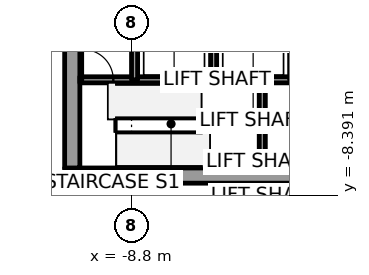
"""IFC4 building model, lengths in metres.
Left out: names, types, materials, properties, quantities, classifications, styles, units other than length and angle.
Written with IfcOpenShell. Run it as: python <this file> out.ifc"""

import sys

from ifc_helpers import new_model, si_unit, direction, frame, frame_2d, origin, place, context, subcontext, project, spatial, rectangle, extrude, element, fill, save


model = new_model("IFC4")
c1 = context("Model", 3, precision=1e-05, world=origin(), true_north=direction((0.0, 1.0)))
c2 = subcontext(c1, "Body", "Model", "MODEL_VIEW")
j1 = project(units=[si_unit("LENGTHUNIT", "METRE"), si_unit("PLANEANGLEUNIT", "RADIAN")], contexts=[c1])
p1 = place(None, origin())
s1 = spatial("IfcSite", under=j1, at=p1, CompositionType="ELEMENT")
p2 = place(p1, origin())
s2 = spatial("IfcBuilding", under=s1, at=p2, CompositionType="ELEMENT")
p3 = place(p2, frame((0.0, 0.0, 9.0)))
s3 = spatial("IfcBuildingStorey", under=s2, at=p3, CompositionType="ELEMENT", Elevation=9.0)
p4 = place(p3, frame((-11.0, -7.75, 0.0), z_axis=(0.0, 0.0, 1.0), x_axis=(1.0, 0.0, 0.0)))
e1 = element("IfcWall", 1, at=p4, inside=s3, PredefinedType="SHEAR", context=c2, shape_type="SweptSolid", body=[
    extrude(rectangle(XDim=22.0, YDim=0.5, at=frame_2d((11.0, 0.0))), origin(), (0.0, 0.0, 1.0), 7.8),
])
p5 = place(p4, frame((10.45, 0.0, 0.0)))
e2 = element("IfcOpeningElement", 2, at=p5, cuts=e1, PredefinedType="OPENING", context=c2, shape_type="SweptSolid", body=[
    extrude(rectangle(XDim=1.1, YDim=2.1, at=frame_2d((0.55, 1.05))), frame((0.0, 0.25, 0.0), z_axis=(0.0, -1.0, 0.0), x_axis=(1.0, 0.0, 0.0)), (0.0, 0.0, 1.0), 0.5),
])
p6 = place(p3, frame((-10.75, -7.5, 0.0), z_axis=(0.0, 0.0, 1.0), x_axis=(0.0, 1.0, 0.0)))
e3 = element("IfcWall", 3, at=p6, inside=s3, PredefinedType="SHEAR", context=c2, shape_type="SweptSolid", body=[
    extrude(rectangle(XDim=15.0, YDim=0.5, at=frame_2d((7.5, 0.0))), origin(), (0.0, 0.0, 1.0), 7.8),
])
p7 = place(p6, frame((6.6, 0.0, 0.0)))
e4 = element("IfcOpeningElement", 4, at=p7, cuts=e3, PredefinedType="OPENING", context=c2, shape_type="SweptSolid", body=[
    extrude(rectangle(XDim=1.8, YDim=2.1, at=frame_2d((0.9, 1.05))), frame((0.0, 0.25, 0.0), z_axis=(0.0, -1.0, 0.0), x_axis=(1.0, 0.0, 0.0)), (0.0, 0.0, 1.0), 0.5),
])
p8 = place(p3, frame((-10.5, -4.6, 0.0), z_axis=(0.0, 0.0, 1.0), x_axis=(1.0, 0.0, 0.0)))
e5 = element("IfcWall", 5, at=p8, inside=s3, PredefinedType="SOLIDWALL", context=c2, shape_type="SweptSolid", body=[
    extrude(rectangle(XDim=1.8, YDim=0.2, at=frame_2d((0.9, 0.0))), origin(), (0.0, 0.0, 1.0), 7.55),
])
p9 = place(p8, frame((0.1, 0.0, 0.0)))
e6 = element("IfcOpeningElement", 6, at=p9, cuts=e5, PredefinedType="OPENING", context=c2, shape_type="SweptSolid", body=[
    extrude(rectangle(XDim=1.0, YDim=2.1, at=frame_2d((0.5, 1.05))), frame((0.0, 0.1, 0.0), z_axis=(0.0, -1.0, 0.0), x_axis=(1.0, 0.0, 0.0)), (0.0, 0.0, 1.0), 0.2),
])
p10 = place(p3, frame((-8.7, -4.6, 0.0), z_axis=(0.0, 0.0, 1.0), x_axis=(1.0, 0.0, 0.0)))
e7 = element("IfcWall", 7, at=p10, inside=s3, PredefinedType="SOLIDWALL", context=c2, shape_type="SweptSolid", body=[
    extrude(rectangle(XDim=2.6, YDim=0.2, at=frame_2d((1.3, 0.0))), origin(), (0.0, 0.0, 1.0), 7.55),
])
p11 = place(p3, frame((-8.7, -4.6, 0.0), z_axis=(0.0, 0.0, 1.0), x_axis=(0.0, 1.0, 0.0)))
e8 = element("IfcWall", 8, at=p11, inside=s3, PredefinedType="SOLIDWALL", context=c2, shape_type="SweptSolid", body=[
    extrude(rectangle(XDim=2.8, YDim=0.2, at=frame_2d((1.4, 0.0))), origin(), (0.0, 0.0, 1.0), 7.55),
])
p12 = place(p3, frame((-6.1, -4.6, 0.0), z_axis=(0.0, 0.0, 1.0), x_axis=(1.0, 0.0, 0.0)))
e9 = element("IfcWall", 9, at=p12, inside=s3, PredefinedType="SOLIDWALL", context=c2, shape_type="SweptSolid", body=[
    extrude(rectangle(XDim=1.6, YDim=0.2, at=frame_2d((0.8, 0.0))), origin(), (0.0, 0.0, 1.0), 7.55),
])
p13 = place(p3, frame((-6.1, -4.6, 0.0), z_axis=(0.0, 0.0, 1.0), x_axis=(0.0, 1.0, 0.0)))
e10 = element("IfcWall", 10, at=p13, inside=s3, PredefinedType="SOLIDWALL", context=c2, shape_type="SweptSolid", body=[
    extrude(rectangle(XDim=2.8, YDim=0.2, at=frame_2d((1.4, 0.0))), origin(), (0.0, 0.0, 1.0), 7.55),
])
p14 = place(p3, frame((-4.5, -4.6, 0.0), z_axis=(0.0, 0.0, 1.0), x_axis=(0.0, -1.0, 0.0)))
e11 = element("IfcWall", 11, at=p14, inside=s3, PredefinedType="SOLIDWALL", context=c2, shape_type="SweptSolid", body=[
    extrude(rectangle(XDim=2.9, YDim=0.2, at=frame_2d((1.45, 0.0))), origin(), (0.0, 0.0, 1.0), 7.55),
])
p15 = place(p3, frame((-4.5, -4.6, 0.0), z_axis=(0.0, 0.0, 1.0), x_axis=(1.0, 0.0, 0.0)))
e12 = element("IfcWall", 12, at=p15, inside=s3, PredefinedType="SOLIDWALL", context=c2, shape_type="SweptSolid", body=[
    extrude(rectangle(XDim=1.0, YDim=0.2, at=frame_2d((0.5, 0.0))), origin(), (0.0, 0.0, 1.0), 7.55),
])
p16 = place(p9, origin())
e13 = element("IfcDoor", 13, at=p16, inside=s3, OperationType="SINGLE_SWING_LEFT", PredefinedType="DOOR", context=c2, shape_type="SweptSolid", body=[
    extrude(rectangle(XDim=1.0, YDim=2.1, at=frame_2d((0.5, 1.05))), frame((0.0, 0.025, 0.0), z_axis=(0.0, -1.0, 0.0), x_axis=(1.0, 0.0, 0.0)), (0.0, 0.0, 1.0), 0.05),
])
fill(e6, e13)
save(model, sys.argv[1])
